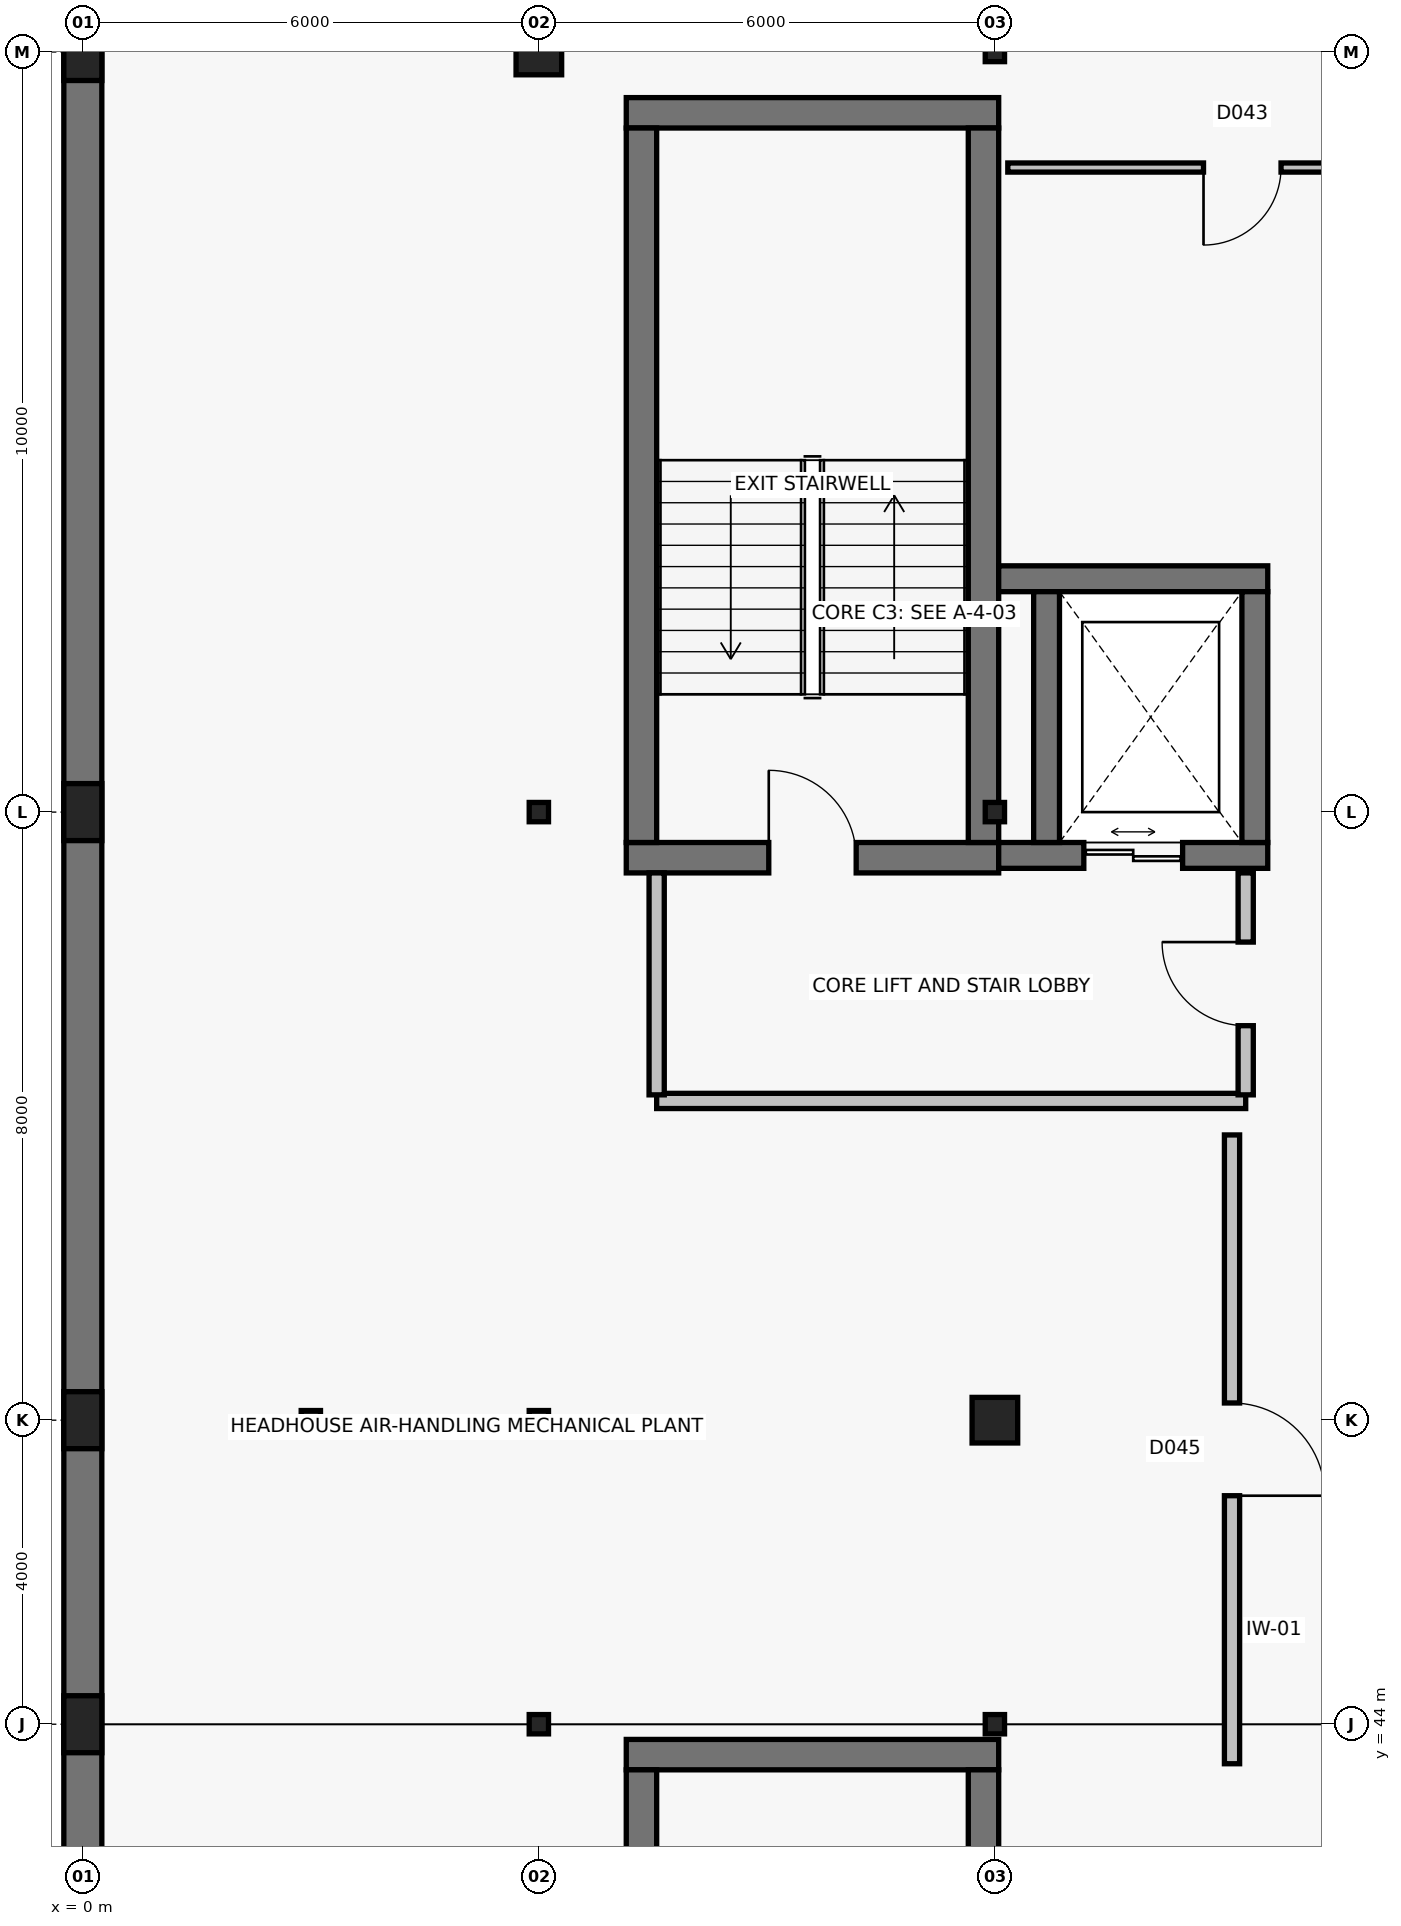
"""IFC4 building model, lengths in metres.
Left out: names, types, materials, properties, quantities, classifications, styles, units other than length and angle.
Written with IfcOpenShell. Run it as: python <this file> out.ifc"""

import sys

from ifc_helpers import new_model, si_unit, direction, frame, frame_2d, origin, origin_2d, place, context, subcontext, project, spatial, rectangle, hollow_rectangle, extrude, element, fill, save


model = new_model("IFC4")
c1 = context("Model", 3, precision=1e-05, world=origin(), true_north=direction((0.0, 1.0)))
c2 = subcontext(c1, "Body", "Model", "MODEL_VIEW")
j1 = project(units=[si_unit("LENGTHUNIT", "METRE"), si_unit("PLANEANGLEUNIT", "RADIAN")], contexts=[c1])
p1 = place(None, origin())
s1 = spatial("IfcSite", under=j1, at=p1, CompositionType="ELEMENT")
p2 = place(p1, origin())
s2 = spatial("IfcBuilding", under=s1, at=p2, CompositionType="ELEMENT")
p3 = place(p2, frame((0.0, 0.0, 11.4)))
s3 = spatial("IfcBuildingStorey", under=s2, at=p3, CompositionType="ELEMENT", Elevation=11.4)
for number, where, z_axis, x_axis in (
    (1, (0.0, 44.0, 0.0), (0.0, 0.0, 1.0), (1.0, 0.0, 0.0)),
    (2, (0.0, 48.0, 0.0), (0.0, 0.0, 1.0), (1.0, 0.0, 0.0)),
    (3, (0.0, 56.0, 0.0), (0.0, 0.0, 1.0), (1.0, 0.0, 0.0)),
    (4, (0.0, 66.0, 0.0), (0.0, 0.0, 1.0), (1.0, 0.0, 0.0)),
):
    element("IfcColumn", number, at=place(p3, frame(where, z_axis=z_axis, x_axis=x_axis)), inside=s3, PredefinedType="PILASTER", context=c2, shape_type="SweptSolid", body=[
        extrude(rectangle(XDim=0.5, YDim=0.75, at=origin_2d()), origin(), (0.0, 0.0, 1.0), 4.0),
    ])
for number, where, z_axis, x_axis in (
    (5, (3.0, 48.0, 0.0), (0.0, 0.0, 1.0), (1.0, 0.0, 0.0)),
    (6, (6.0, 44.0, 0.0), (0.0, 0.0, 1.0), (1.0, 0.0, 0.0)),
    (7, (6.0, 48.0, 0.0), (0.0, 0.0, 1.0), (1.0, 0.0, 0.0)),
    (8, (6.0, 56.0, 0.0), (0.0, 0.0, 1.0), (1.0, 0.0, 0.0)),
):
    element("IfcColumn", number, at=place(p3, frame(where, z_axis=z_axis, x_axis=x_axis)), inside=s3, PredefinedType="COLUMN", context=c2, shape_type="SweptSolid", body=[
        extrude(hollow_rectangle(XDim=0.254, YDim=0.254, WallThickness=0.01, InnerFilletRadius=0.01, OuterFilletRadius=0.019, at=origin_2d()), origin(), (0.0, 0.0, 1.0), 4.0),
    ])
p4 = place(p3, frame((6.0, 66.0, 0.0), z_axis=(0.0, 0.0, 1.0), x_axis=(1.0, 0.0, 0.0)))
e9 = element("IfcColumn", 9, at=p4, inside=s3, PredefinedType="COLUMN", context=c2, shape_type="SweptSolid", body=[
    extrude(rectangle(XDim=0.6, YDim=0.6, at=origin_2d()), origin(), (0.0, 0.0, 1.0), 4.0),
])
p5 = place(p3, frame((12.0, 44.0, 0.0), z_axis=(0.0, 0.0, 1.0), x_axis=(1.0, 0.0, 0.0)))
e10 = element("IfcColumn", 10, at=p5, inside=s3, PredefinedType="COLUMN", context=c2, shape_type="SweptSolid", body=[
    extrude(hollow_rectangle(XDim=0.254, YDim=0.254, WallThickness=0.01, InnerFilletRadius=0.01, OuterFilletRadius=0.019, at=origin_2d()), origin(), (0.0, 0.0, 1.0), 4.0),
])
p6 = place(p3, frame((12.0, 48.0, 0.0), z_axis=(0.0, 0.0, 1.0), x_axis=(1.0, 0.0, 0.0)))
e11 = element("IfcColumn", 11, at=p6, inside=s3, PredefinedType="COLUMN", context=c2, shape_type="SweptSolid", body=[
    extrude(rectangle(XDim=0.6, YDim=0.6, at=origin_2d()), origin(), (0.0, 0.0, 1.0), 4.0),
])
for number, where, z_axis, x_axis in (
    (12, (12.0, 56.0, 0.0), (0.0, 0.0, 1.0), (1.0, 0.0, 0.0)),
    (13, (12.0, 66.0, 0.0), (0.0, 0.0, 1.0), (1.0, 0.0, 0.0)),
):
    element("IfcColumn", number, at=place(p3, frame(where, z_axis=z_axis, x_axis=x_axis)), inside=s3, PredefinedType="COLUMN", context=c2, shape_type="SweptSolid", body=[
        extrude(hollow_rectangle(XDim=0.254, YDim=0.254, WallThickness=0.01, InnerFilletRadius=0.01, OuterFilletRadius=0.019, at=origin_2d()), origin(), (0.0, 0.0, 1.0), 4.0),
    ])
p7 = place(p3, frame((0.0, -0.008, 0.0), z_axis=(0.0, 0.0, 1.0), x_axis=(0.0, 1.0, 0.0)))
e14 = element("IfcWall", 14, at=p7, inside=s3, PredefinedType="SOLIDWALL", context=c2, shape_type="SweptSolid", body=[
    extrude(rectangle(XDim=84.016, YDim=0.5, at=frame_2d((42.008, 0.0))), origin(), (0.0, 0.0, 1.0), 3.68),
])
p8 = place(p3, frame((12.05, 43.6, 0.0), z_axis=(0.0, 0.0, 1.0), x_axis=(-1.0, 0.0, 0.0)))
e15 = element("IfcWall", 15, at=p8, inside=s3, PredefinedType="SHEAR", context=c2, shape_type="SweptSolid", body=[
    extrude(rectangle(XDim=4.9, YDim=0.4, at=frame_2d((2.45, 0.0))), origin(), (0.0, 0.0, 1.0), 3.76),
])
for number, where, z_axis, x_axis in (
    (16, (7.35, 43.4, 0.0), (0.0, 0.0, 1.0), (0.0, -1.0, 0.0)),
    (17, (11.85, 34.0, 0.0), (0.0, 0.0, 1.0), (0.0, 1.0, 0.0)),
):
    element("IfcWall", number, at=place(p3, frame(where, z_axis=z_axis, x_axis=x_axis)), inside=s3, PredefinedType="SHEAR", context=c2, shape_type="SweptSolid", body=[
        extrude(rectangle(XDim=9.4, YDim=0.4, at=frame_2d((4.7, 0.0))), origin(), (0.0, 0.0, 1.0), 3.76),
    ])
p9 = place(p3, frame((7.15, 55.4, 0.0), z_axis=(0.0, 0.0, 1.0), x_axis=(1.0, 0.0, 0.0)))
e18 = element("IfcWall", 18, at=p9, inside=s3, PredefinedType="SHEAR", context=c2, shape_type="SweptSolid", body=[
    extrude(rectangle(XDim=4.9, YDim=0.4, at=frame_2d((2.45, 0.0))), origin(), (0.0, 0.0, 1.0), 3.76),
])
p10 = place(p9, frame((1.875, 0.0, 0.0)))
e19 = element("IfcOpeningElement", 19, at=p10, cuts=e18, PredefinedType="OPENING", context=c2, shape_type="SweptSolid", body=[
    extrude(rectangle(XDim=1.15, YDim=2.15, at=frame_2d((0.575, 1.075))), frame((0.0, 0.215, 0.0), z_axis=(0.0, -1.0, 0.0), x_axis=(1.0, 0.0, 0.0)), (0.0, 0.0, 1.0), 0.43),
])
p11 = place(p3, frame((12.05, 65.2, 0.0), z_axis=(0.0, 0.0, 1.0), x_axis=(-1.0, 0.0, 0.0)))
e20 = element("IfcWall", 20, at=p11, inside=s3, PredefinedType="SHEAR", context=c2, shape_type="SweptSolid", body=[
    extrude(rectangle(XDim=4.9, YDim=0.4, at=frame_2d((2.45, 0.0))), origin(), (0.0, 0.0, 1.0), 3.76),
])
for number, where, z_axis, x_axis in (
    (21, (7.35, 65.0, 0.0), (0.0, 0.0, 1.0), (0.0, -1.0, 0.0)),
    (22, (11.85, 55.6, 0.0), (0.0, 0.0, 1.0), (0.0, 1.0, 0.0)),
):
    element("IfcWall", number, at=place(p3, frame(where, z_axis=z_axis, x_axis=x_axis)), inside=s3, PredefinedType="SHEAR", context=c2, shape_type="SweptSolid", body=[
        extrude(rectangle(XDim=9.4, YDim=0.4, at=frame_2d((4.7, 0.0))), origin(), (0.0, 0.0, 1.0), 3.76),
    ])
p12 = place(p3, frame((12.05, 55.43, 0.0), z_axis=(0.0, 0.0, 1.0), x_axis=(1.0, 0.0, 0.0)))
e23 = element("IfcWall", 23, at=p12, inside=s3, PredefinedType="SHEAR", context=c2, shape_type="SweptSolid", body=[
    extrude(rectangle(XDim=3.54, YDim=0.34, at=frame_2d((1.77, 0.0))), origin(), (0.0, 0.0, 1.0), 3.76),
])
p13 = place(p12, frame((1.12, 0.0, 0.0)))
e24 = element("IfcOpeningElement", 24, at=p13, cuts=e23, PredefinedType="OPENING", context=c2, shape_type="SweptSolid", body=[
    extrude(rectangle(XDim=1.3, YDim=2.25, at=frame_2d((0.65, 1.125))), frame((0.0, 0.185, 0.0), z_axis=(0.0, -1.0, 0.0), x_axis=(1.0, 0.0, 0.0)), (0.0, 0.0, 1.0), 0.37),
])
p14 = place(p3, frame((15.59, 59.07, 0.0), z_axis=(0.0, 0.0, 1.0), x_axis=(-1.0, 0.0, 0.0)))
e25 = element("IfcWall", 25, at=p14, inside=s3, PredefinedType="SHEAR", context=c2, shape_type="SweptSolid", body=[
    extrude(rectangle(XDim=3.54, YDim=0.34, at=frame_2d((1.77, 0.0))), origin(), (0.0, 0.0, 1.0), 3.76),
])
for number, where, z_axis, x_axis in (
    (26, (12.68, 58.9, 0.0), (0.0, 0.0, 1.0), (0.0, -1.0, 0.0)),
    (27, (15.42, 55.6, 0.0), (0.0, 0.0, 1.0), (0.0, 1.0, 0.0)),
):
    element("IfcWall", number, at=place(p3, frame(where, z_axis=z_axis, x_axis=x_axis)), inside=s3, PredefinedType="SHEAR", context=c2, shape_type="SweptSolid", body=[
        extrude(rectangle(XDim=3.3, YDim=0.34, at=frame_2d((1.65, 0.0))), origin(), (0.0, 0.0, 1.0), 3.76),
    ])
p15 = place(p3, frame((7.55, 52.2, 0.0), z_axis=(0.0, 0.0, 1.0), x_axis=(1.0, 0.0, 0.0)))
e28 = element("IfcWall", 28, at=p15, inside=s3, PredefinedType="PARTITIONING", context=c2, shape_type="SweptSolid", body=[
    extrude(rectangle(XDim=7.75, YDim=0.2, at=frame_2d((3.875, 0.0))), origin(), (0.0, 0.0, 1.0), 2.957),
])
p16 = place(p3, frame((7.55, 55.2, 0.0), z_axis=(0.0, 0.0, 1.0), x_axis=(0.0, -1.0, 0.0)))
e29 = element("IfcWall", 29, at=p16, inside=s3, PredefinedType="PARTITIONING", context=c2, shape_type="SweptSolid", body=[
    extrude(rectangle(XDim=2.92, YDim=0.2, at=frame_2d((1.46, 0.0))), origin(), (0.0, 0.0, 1.0), 3.68),
])
p17 = place(p3, frame((15.3, 52.28, 0.0), z_axis=(0.0, 0.0, 1.0), x_axis=(0.0, 1.0, 0.0)))
e30 = element("IfcWall", 30, at=p17, inside=s3, PredefinedType="PARTITIONING", context=c2, shape_type="SweptSolid", body=[
    extrude(rectangle(XDim=2.92, YDim=0.2, at=frame_2d((1.46, 0.0))), origin(), (0.0, 0.0, 1.0), 3.68),
])
p18 = place(p17, frame((0.91, 0.0, 0.0)))
e31 = element("IfcOpeningElement", 31, at=p18, cuts=e30, PredefinedType="OPENING", context=c2, shape_type="SweptSolid", body=[
    extrude(rectangle(XDim=1.1, YDim=2.15, at=frame_2d((0.55, 1.075))), frame((0.0, 0.115, 0.0), z_axis=(0.0, -1.0, 0.0), x_axis=(1.0, 0.0, 0.0)), (0.0, 0.0, 1.0), 0.23),
])
p19 = place(p3, frame((18.34, 64.48, 0.0), z_axis=(0.0, 0.0, 1.0), x_axis=(-1.0, 0.0, 0.0)))
e32 = element("IfcWall", 32, at=p19, inside=s3, PredefinedType="PARTITIONING", context=c2, shape_type="SweptSolid", body=[
    extrude(rectangle(XDim=6.17, YDim=0.12, at=frame_2d((3.085, 0.0))), origin(), (0.0, 0.0, 1.0), 2.957),
])
p20 = place(p19, frame((2.575, 0.0, 0.0)))
e33 = element("IfcOpeningElement", 33, at=p20, cuts=e32, PredefinedType="OPENING", context=c2, shape_type="SweptSolid", body=[
    extrude(rectangle(XDim=1.02, YDim=2.1, at=frame_2d((0.51, 1.05))), frame((0.0, 0.075, 0.0), z_axis=(0.0, -1.0, 0.0), x_axis=(1.0, 0.0, 0.0)), (0.0, 0.0, 1.0), 0.15),
])
p21 = place(p3, frame((15.12, 51.753, 0.0), z_axis=(0.0, 0.0, 1.0), x_axis=(0.0, -1.0, 0.0)))
e34 = element("IfcWall", 34, at=p21, inside=s3, PredefinedType="PARTITIONING", context=c2, shape_type="SweptSolid", body=[
    extrude(rectangle(XDim=8.273, YDim=0.2, at=frame_2d((4.136, 0.0))), origin(), (0.0, 0.0, 1.0), 3.111),
])
p22 = place(p21, frame((3.526, 0.0, 0.0)))
e35 = element("IfcOpeningElement", 35, at=p22, cuts=e34, PredefinedType="OPENING", context=c2, shape_type="SweptSolid", body=[
    extrude(rectangle(XDim=1.22, YDim=2.2, at=frame_2d((0.61, 1.1))), frame((0.0, 0.115, 0.0), z_axis=(0.0, -1.0, 0.0), x_axis=(1.0, 0.0, 0.0)), (0.0, 0.0, 1.0), 0.23),
])
p23 = place(p10, origin())
e36 = element("IfcDoor", 36, at=p23, inside=s3, OperationType="SINGLE_SWING_LEFT", PredefinedType="DOOR", context=c2, shape_type="SweptSolid", body=[
    extrude(rectangle(XDim=1.15, YDim=2.15, at=frame_2d((0.575, 1.075))), frame((0.0, 0.025, 0.0), z_axis=(0.0, -1.0, 0.0), x_axis=(1.0, 0.0, 0.0)), (0.0, 0.0, 1.0), 0.05),
])
fill(e19, e36)
p24 = place(p13, origin())
e37 = element("IfcDoor", 37, at=p24, inside=s3, OperationType="DOUBLE_DOOR_SLIDING", PredefinedType="DOOR", context=c2, shape_type="SweptSolid", body=[
    extrude(rectangle(XDim=1.3, YDim=2.25, at=frame_2d((0.65, 1.125))), frame((0.0, 0.025, 0.0), z_axis=(0.0, -1.0, 0.0), x_axis=(1.0, 0.0, 0.0)), (0.0, 0.0, 1.0), 0.05),
])
fill(e24, e37)
p25 = place(p18, origin())
e38 = element("IfcDoor", 38, at=p25, inside=s3, OperationType="SINGLE_SWING_RIGHT", PredefinedType="DOOR", context=c2, shape_type="SweptSolid", body=[
    extrude(rectangle(XDim=1.1, YDim=2.15, at=frame_2d((0.55, 1.075))), frame((0.0, 0.025, 0.0), z_axis=(0.0, -1.0, 0.0), x_axis=(1.0, 0.0, 0.0)), (0.0, 0.0, 1.0), 0.05),
])
fill(e31, e38)
p26 = place(p20, origin())
e39 = element("IfcDoor", 39, at=p26, inside=s3, OperationType="SINGLE_SWING_RIGHT", PredefinedType="DOOR", context=c2, shape_type="SweptSolid", body=[
    extrude(rectangle(XDim=1.02, YDim=2.1, at=frame_2d((0.51, 1.05))), frame((0.0, 0.025, 0.0), z_axis=(0.0, -1.0, 0.0), x_axis=(1.0, 0.0, 0.0)), (0.0, 0.0, 1.0), 0.05),
])
fill(e33, e39)
p27 = place(p22, origin())
e40 = element("IfcDoor", 40, at=p27, inside=s3, OperationType="SINGLE_SWING_RIGHT", PredefinedType="DOOR", context=c2, shape_type="SweptSolid", body=[
    extrude(rectangle(XDim=1.22, YDim=2.2, at=frame_2d((0.61, 1.1))), frame((0.0, 0.025, 0.0), z_axis=(0.0, -1.0, 0.0), x_axis=(1.0, 0.0, 0.0)), (0.0, 0.0, 1.0), 0.05),
])
fill(e35, e40)
save(model, sys.argv[1])
